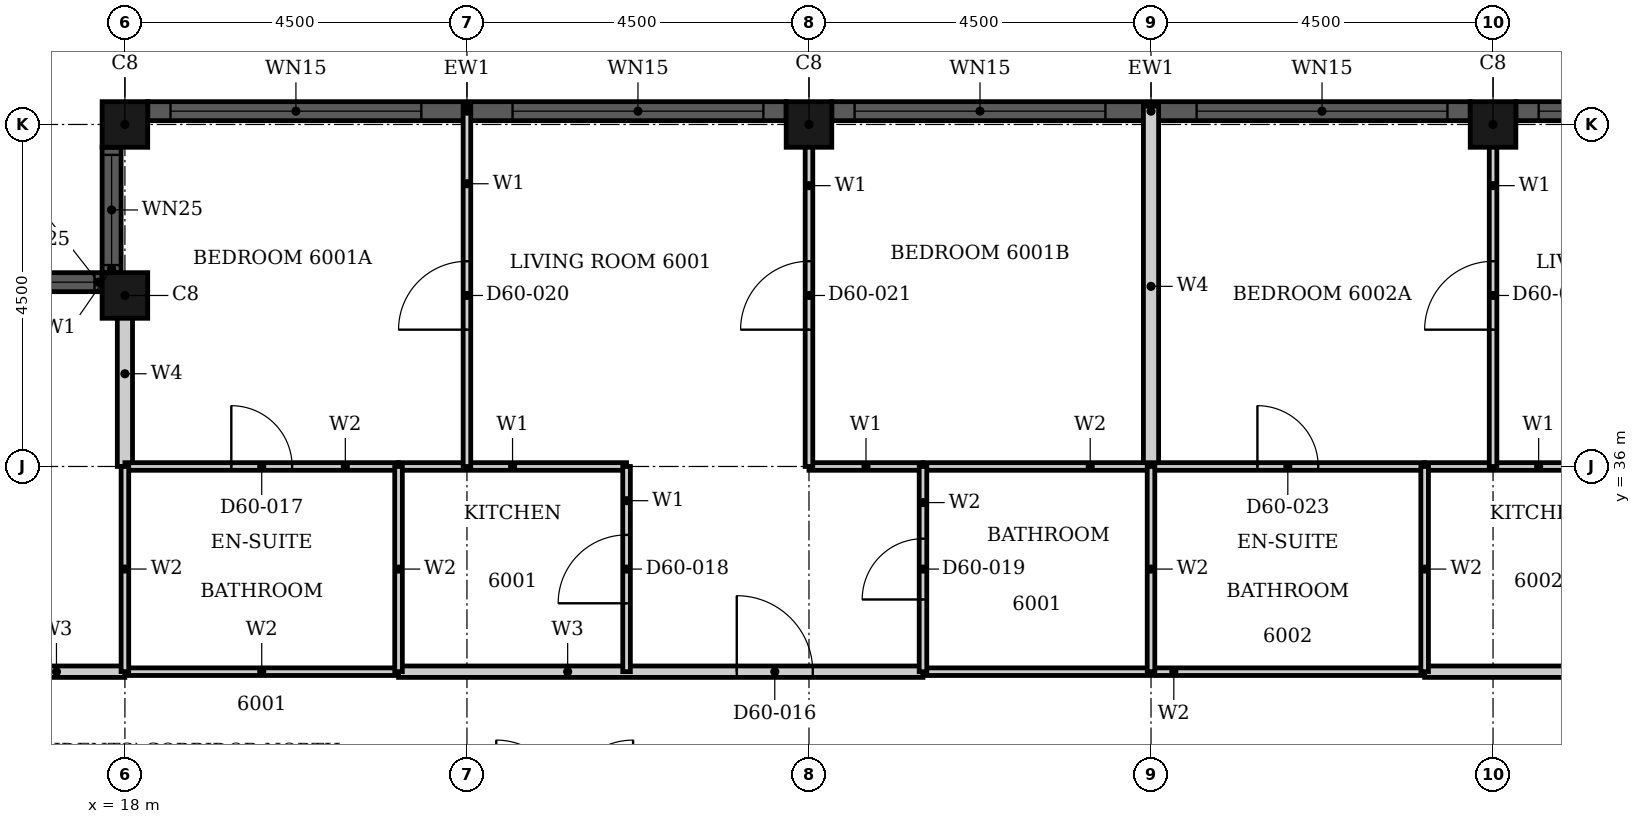
"""IFC4 building model, lengths in metres.
Left out: names, types, materials, properties, quantities, classifications, styles, units other than length and angle.
Written with IfcOpenShell. Run it as: python <this file> out.ifc"""

import sys

from ifc_helpers import new_model, si_unit, direction, frame, frame_2d, origin, origin_2d, place, context, subcontext, project, spatial, rectangle, hollow_rectangle, extrude, element, fill, save


model = new_model("IFC4")
c1 = context("Model", 3, precision=1e-05, world=origin(), true_north=direction((0.0, 1.0)))
c2 = subcontext(c1, "Body", "Model", "MODEL_VIEW")
j1 = project(units=[si_unit("LENGTHUNIT", "METRE"), si_unit("PLANEANGLEUNIT", "RADIAN")], contexts=[c1])
p1 = place(None, origin())
s1 = spatial("IfcSite", under=j1, at=p1, CompositionType="ELEMENT")
p2 = place(p1, origin())
s2 = spatial("IfcBuilding", under=s1, at=p2, CompositionType="ELEMENT")
p3 = place(p2, frame((0.0, 0.0, 237.9)))
s3 = spatial("IfcBuildingStorey", under=s2, at=p3, CompositionType="ELEMENT", Elevation=237.9)
for number, where, z_axis, x_axis in (
    (1, (36.0, 40.5, 0.0), (0.0, 0.0, 1.0), (1.0, 0.0, 0.0)),
    (2, (27.0, 40.5, 0.0), (0.0, 0.0, 1.0), (1.0, 0.0, 0.0)),
    (3, (18.0, 40.5, 0.0), (0.0, 0.0, 1.0), (1.0, 0.0, 0.0)),
    (4, (18.0, 38.25, 0.0), (0.0, 0.0, 1.0), (1.0, 0.0, 0.0)),
):
    element("IfcColumn", number, at=place(p3, frame(where, z_axis=z_axis, x_axis=x_axis)), inside=s3, PredefinedType="COLUMN", context=c2, shape_type="SweptSolid", body=[
        extrude(hollow_rectangle(XDim=0.6, YDim=0.6, WallThickness=0.02, at=origin_2d()), origin(), (0.0, 0.0, 1.0), 3.7),
    ])
p4 = place(p3, frame((44.7, 40.675, 0.0), z_axis=(0.0, 0.0, 1.0), x_axis=(-1.0, 0.0, 0.0)))
e5 = element("IfcWall", 5, at=p4, inside=s3, PredefinedType="SOLIDWALL", context=c2, shape_type="SweptSolid", body=[
    extrude(rectangle(XDim=8.4, YDim=0.25, at=frame_2d((4.2, 0.0))), origin(), (0.0, 0.0, 1.0), 3.7),
])
p5 = place(p4, frame((0.3, 0.0, 0.45)))
e6 = element("IfcOpeningElement", 6, at=p5, cuts=e5, PredefinedType="OPENING", context=c2, shape_type="SweptSolid", body=[
    extrude(rectangle(XDim=3.3, YDim=2.3, at=frame_2d((1.65, 1.15))), frame((0.0, 0.135, 0.0), z_axis=(0.0, -1.0, 0.0), x_axis=(1.0, 0.0, 0.0)), (0.0, 0.0, 1.0), 0.27),
])
p6 = place(p4, frame((4.8, 0.0, 0.45)))
e7 = element("IfcOpeningElement", 7, at=p6, cuts=e5, PredefinedType="OPENING", context=c2, shape_type="SweptSolid", body=[
    extrude(rectangle(XDim=3.3, YDim=2.3, at=frame_2d((1.65, 1.15))), frame((0.0, 0.135, 0.0), z_axis=(0.0, -1.0, 0.0), x_axis=(1.0, 0.0, 0.0)), (0.0, 0.0, 1.0), 0.27),
])
p7 = place(p3, frame((35.7, 40.675, 0.0), z_axis=(0.0, 0.0, 1.0), x_axis=(-1.0, 0.0, 0.0)))
e8 = element("IfcWall", 8, at=p7, inside=s3, PredefinedType="SOLIDWALL", context=c2, shape_type="SweptSolid", body=[
    extrude(rectangle(XDim=8.4, YDim=0.25, at=frame_2d((4.2, 0.0))), origin(), (0.0, 0.0, 1.0), 3.7),
])
p8 = place(p7, frame((0.3, 0.0, 0.45)))
e9 = element("IfcOpeningElement", 9, at=p8, cuts=e8, PredefinedType="OPENING", context=c2, shape_type="SweptSolid", body=[
    extrude(rectangle(XDim=3.3, YDim=2.3, at=frame_2d((1.65, 1.15))), frame((0.0, 0.135, 0.0), z_axis=(0.0, -1.0, 0.0), x_axis=(1.0, 0.0, 0.0)), (0.0, 0.0, 1.0), 0.27),
])
p9 = place(p7, frame((4.8, 0.0, 0.45)))
e10 = element("IfcOpeningElement", 10, at=p9, cuts=e8, PredefinedType="OPENING", context=c2, shape_type="SweptSolid", body=[
    extrude(rectangle(XDim=3.3, YDim=2.3, at=frame_2d((1.65, 1.15))), frame((0.0, 0.135, 0.0), z_axis=(0.0, -1.0, 0.0), x_axis=(1.0, 0.0, 0.0)), (0.0, 0.0, 1.0), 0.27),
])
p10 = place(p3, frame((26.7, 40.675, 0.0), z_axis=(0.0, 0.0, 1.0), x_axis=(-1.0, 0.0, 0.0)))
e11 = element("IfcWall", 11, at=p10, inside=s3, PredefinedType="SOLIDWALL", context=c2, shape_type="SweptSolid", body=[
    extrude(rectangle(XDim=8.4, YDim=0.25, at=frame_2d((4.2, 0.0))), origin(), (0.0, 0.0, 1.0), 3.7),
])
p11 = place(p10, frame((0.3, 0.0, 0.45)))
e12 = element("IfcOpeningElement", 12, at=p11, cuts=e11, PredefinedType="OPENING", context=c2, shape_type="SweptSolid", body=[
    extrude(rectangle(XDim=3.3, YDim=2.3, at=frame_2d((1.65, 1.15))), frame((0.0, 0.135, 0.0), z_axis=(0.0, -1.0, 0.0), x_axis=(1.0, 0.0, 0.0)), (0.0, 0.0, 1.0), 0.27),
])
p12 = place(p10, frame((4.8, 0.0, 0.45)))
e13 = element("IfcOpeningElement", 13, at=p12, cuts=e11, PredefinedType="OPENING", context=c2, shape_type="SweptSolid", body=[
    extrude(rectangle(XDim=3.3, YDim=2.3, at=frame_2d((1.65, 1.15))), frame((0.0, 0.135, 0.0), z_axis=(0.0, -1.0, 0.0), x_axis=(1.0, 0.0, 0.0)), (0.0, 0.0, 1.0), 0.27),
])
p13 = place(p3, frame((17.825, 40.2, 0.0), z_axis=(0.0, 0.0, 1.0), x_axis=(0.0, -1.0, 0.0)))
e14 = element("IfcWall", 14, at=p13, inside=s3, PredefinedType="SOLIDWALL", context=c2, shape_type="SweptSolid", body=[
    extrude(rectangle(XDim=1.65, YDim=0.25, at=frame_2d((0.825, 0.0))), origin(), (0.0, 0.0, 1.0), 3.7),
])
p14 = place(p13, frame((0.1, 0.0, 0.9)))
e15 = element("IfcOpeningElement", 15, at=p14, cuts=e14, PredefinedType="OPENING", context=c2, shape_type="SweptSolid", body=[
    extrude(rectangle(XDim=1.45, YDim=1.85, at=frame_2d((0.725, 0.925))), frame((0.0, 0.135, 0.0), z_axis=(0.0, -1.0, 0.0), x_axis=(1.0, 0.0, 0.0)), (0.0, 0.0, 1.0), 0.27),
])
p15 = place(p3, frame((17.7, 38.425, 0.0), z_axis=(0.0, 0.0, 1.0), x_axis=(-1.0, 0.0, 0.0)))
e16 = element("IfcWall", 16, at=p15, inside=s3, PredefinedType="SOLIDWALL", context=c2, shape_type="SweptSolid", body=[
    extrude(rectangle(XDim=1.65, YDim=0.25, at=frame_2d((0.825, 0.0))), origin(), (0.0, 0.0, 1.0), 3.7),
])
p16 = place(p15, frame((0.1, 0.0, 0.9)))
e17 = element("IfcOpeningElement", 17, at=p16, cuts=e16, PredefinedType="OPENING", context=c2, shape_type="SweptSolid", body=[
    extrude(rectangle(XDim=1.45, YDim=1.85, at=frame_2d((0.725, 0.925))), frame((0.0, 0.135, 0.0), z_axis=(0.0, -1.0, 0.0), x_axis=(1.0, 0.0, 0.0)), (0.0, 0.0, 1.0), 0.27),
])
p17 = place(p3, frame((21.6, 33.3, 0.0), z_axis=(0.0, 0.0, 1.0), x_axis=(1.0, 0.0, 0.0)))
e18 = element("IfcWall", 18, at=p17, inside=s3, PredefinedType="PARTITIONING", context=c2, shape_type="SweptSolid", body=[
    extrude(rectangle(XDim=6.9, YDim=0.15, at=frame_2d((3.45, 0.0))), origin(), (0.0, 0.0, 1.0), 3.4),
])
p18 = place(p17, frame((4.45, 0.0, 0.0)))
e19 = element("IfcOpeningElement", 19, at=p18, cuts=e18, PredefinedType="OPENING", context=c2, shape_type="SweptSolid", body=[
    extrude(rectangle(XDim=1.0, YDim=2.2, at=frame_2d((0.5, 1.1))), frame((0.0, 0.085, 0.0), z_axis=(0.0, -1.0, 0.0), x_axis=(1.0, 0.0, 0.0)), (0.0, 0.0, 1.0), 0.17),
])
p19 = place(p3, frame((35.1, 33.3, 0.0), z_axis=(0.0, 0.0, 1.0), x_axis=(1.0, 0.0, 0.0)))
e20 = element("IfcWall", 20, at=p19, inside=s3, PredefinedType="PARTITIONING", context=c2, shape_type="SweptSolid", body=[
    extrude(rectangle(XDim=6.9, YDim=0.15, at=frame_2d((3.45, 0.0))), origin(), (0.0, 0.0, 1.0), 3.4),
])
p20 = place(p19, frame((4.45, 0.0, 0.0)))
e21 = element("IfcOpeningElement", 21, at=p20, cuts=e20, PredefinedType="OPENING", context=c2, shape_type="SweptSolid", body=[
    extrude(rectangle(XDim=1.0, YDim=2.2, at=frame_2d((0.5, 1.1))), frame((0.0, 0.085, 0.0), z_axis=(0.0, -1.0, 0.0), x_axis=(1.0, 0.0, 0.0)), (0.0, 0.0, 1.0), 0.17),
])
p21 = place(p3, frame((16.2, 33.3, 0.0), z_axis=(0.0, 0.0, 1.0), x_axis=(1.0, 0.0, 0.0)))
e22 = element("IfcWall", 22, at=p21, inside=s3, PredefinedType="PARTITIONING", context=c2, shape_type="SweptSolid", body=[
    extrude(rectangle(XDim=1.799, YDim=0.15, at=frame_2d((0.899, 0.0))), origin(), (0.0, 0.0, 1.0), 3.4),
])
p22 = place(p3, frame((27.0, 36.0, 0.0), z_axis=(0.0, 0.0, 1.0), x_axis=(1.0, 0.0, 0.0)))
e23 = element("IfcWall", 23, at=p22, inside=s3, PredefinedType="PARTITIONING", context=c2, shape_type="SweptSolid", body=[
    extrude(rectangle(XDim=1.5, YDim=0.1, at=frame_2d((0.75, 0.0))), origin(), (0.0, 0.0, 1.0), 3.4),
])
for number, where, z_axis, x_axis in (
    (24, (21.6, 36.0, 0.0), (0.0, 0.0, 1.0), (1.0, 0.0, 0.0)),
    (25, (35.1, 36.0, 0.0), (0.0, 0.0, 1.0), (1.0, 0.0, 0.0)),
):
    element("IfcWall", number, at=place(p3, frame(where, z_axis=z_axis, x_axis=x_axis)), inside=s3, PredefinedType="PARTITIONING", context=c2, shape_type="SweptSolid", body=[
        extrude(rectangle(XDim=3.0, YDim=0.1, at=frame_2d((1.5, 0.0))), origin(), (0.0, 0.0, 1.0), 3.4),
    ])
p23 = place(p3, frame((22.5, 36.0, 0.0), z_axis=(0.0, 0.0, 1.0), x_axis=(0.0, 1.0, 0.0)))
e26 = element("IfcWall", 26, at=p23, inside=s3, PredefinedType="PARTITIONING", context=c2, shape_type="SweptSolid", body=[
    extrude(rectangle(XDim=4.74, YDim=0.1, at=frame_2d((2.37, 0.0))), origin(), (0.0, 0.0, 1.0), 3.4),
])
p24 = place(p23, frame((1.8, 0.0, 0.0)))
e27 = element("IfcOpeningElement", 27, at=p24, cuts=e26, PredefinedType="OPENING", context=c2, shape_type="SweptSolid", body=[
    extrude(rectangle(XDim=0.9, YDim=2.1, at=frame_2d((0.45, 1.05))), frame((0.0, 0.06, 0.0), z_axis=(0.0, -1.0, 0.0), x_axis=(1.0, 0.0, 0.0)), (0.0, 0.0, 1.0), 0.12),
])
p25 = place(p3, frame((24.6, 33.3, 0.0), z_axis=(0.0, 0.0, 1.0), x_axis=(0.0, 1.0, 0.0)))
e28 = element("IfcWall", 28, at=p25, inside=s3, PredefinedType="PARTITIONING", context=c2, shape_type="SweptSolid", body=[
    extrude(rectangle(XDim=2.7, YDim=0.1, at=frame_2d((1.35, 0.0))), origin(), (0.0, 0.0, 1.0), 3.4),
])
p26 = place(p25, frame((0.9, 0.0, 0.0)))
e29 = element("IfcOpeningElement", 29, at=p26, cuts=e28, PredefinedType="OPENING", context=c2, shape_type="SweptSolid", body=[
    extrude(rectangle(XDim=0.9, YDim=2.1, at=frame_2d((0.45, 1.05))), frame((0.0, 0.06, 0.0), z_axis=(0.0, -1.0, 0.0), x_axis=(1.0, 0.0, 0.0)), (0.0, 0.0, 1.0), 0.12),
])
p27 = place(p3, frame((27.0, 36.0, 0.0), z_axis=(0.0, 0.0, 1.0), x_axis=(0.0, 1.0, 0.0)))
e30 = element("IfcWall", 30, at=p27, inside=s3, PredefinedType="PARTITIONING", context=c2, shape_type="SweptSolid", body=[
    extrude(rectangle(XDim=4.69, YDim=0.1, at=frame_2d((2.345, 0.0))), origin(), (0.0, 0.0, 1.0), 3.4),
])
p28 = place(p27, frame((1.8, 0.0, 0.0)))
e31 = element("IfcOpeningElement", 31, at=p28, cuts=e30, PredefinedType="OPENING", context=c2, shape_type="SweptSolid", body=[
    extrude(rectangle(XDim=0.9, YDim=2.1, at=frame_2d((0.45, 1.05))), frame((0.0, 0.06, 0.0), z_axis=(0.0, -1.0, 0.0), x_axis=(1.0, 0.0, 0.0)), (0.0, 0.0, 1.0), 0.12),
])
p29 = place(p3, frame((36.0, 36.0, 0.0), z_axis=(0.0, 0.0, 1.0), x_axis=(0.0, 1.0, 0.0)))
e32 = element("IfcWall", 32, at=p29, inside=s3, PredefinedType="PARTITIONING", context=c2, shape_type="SweptSolid", body=[
    extrude(rectangle(XDim=4.69, YDim=0.1, at=frame_2d((2.345, 0.0))), origin(), (0.0, 0.0, 1.0), 3.4),
])
p30 = place(p29, frame((1.8, 0.0, 0.0)))
e33 = element("IfcOpeningElement", 33, at=p30, cuts=e32, PredefinedType="OPENING", context=c2, shape_type="SweptSolid", body=[
    extrude(rectangle(XDim=0.9, YDim=2.1, at=frame_2d((0.45, 1.05))), frame((0.0, 0.06, 0.0), z_axis=(0.0, -1.0, 0.0), x_axis=(1.0, 0.0, 0.0)), (0.0, 0.0, 1.0), 0.12),
])
p31 = place(p3, frame((18.0, 36.0, 0.0), z_axis=(0.0, 0.0, 1.0), x_axis=(0.0, 1.0, 0.0)))
e34 = element("IfcWall", 34, at=p31, inside=s3, PredefinedType="PARTITIONING", context=c2, shape_type="SweptSolid", body=[
    extrude(rectangle(XDim=2.44, YDim=0.2, at=frame_2d((1.22, 0.0))), origin(), (0.0, 0.0, 1.0), 3.4),
])
p32 = place(p3, frame((31.5, 36.0, 0.0), z_axis=(0.0, 0.0, 1.0), x_axis=(0.0, 1.0, 0.0)))
e35 = element("IfcWall", 35, at=p32, inside=s3, PredefinedType="PARTITIONING", context=c2, shape_type="SweptSolid", body=[
    extrude(rectangle(XDim=4.74, YDim=0.2, at=frame_2d((2.37, 0.0))), origin(), (0.0, 0.0, 1.0), 3.4),
])
p33 = place(p3, frame((28.5, 33.3, 0.0), z_axis=(0.0, 0.0, 1.0), x_axis=(1.0, 0.0, 0.0)))
e36 = element("IfcWall", 36, at=p33, inside=s3, PredefinedType="PARTITIONING", context=c2, shape_type="SweptSolid", body=[
    extrude(rectangle(XDim=6.6, YDim=0.1, at=frame_2d((3.3, 0.0))), origin(), (0.0, 0.0, 1.0), 3.4),
])
p34 = place(p3, frame((18.0, 33.3, 0.0), z_axis=(0.0, 0.0, 1.0), x_axis=(1.0, 0.0, 0.0)))
e37 = element("IfcWall", 37, at=p34, inside=s3, PredefinedType="PARTITIONING", context=c2, shape_type="SweptSolid", body=[
    extrude(rectangle(XDim=3.6, YDim=0.1, at=frame_2d((1.8, 0.0))), origin(), (0.0, 0.0, 1.0), 3.4),
])
p35 = place(p3, frame((28.5, 36.0, 0.0), z_axis=(0.0, 0.0, 1.0), x_axis=(1.0, 0.0, 0.0)))
e38 = element("IfcWall", 38, at=p35, inside=s3, PredefinedType="PARTITIONING", context=c2, shape_type="SweptSolid", body=[
    extrude(rectangle(XDim=6.6, YDim=0.1, at=frame_2d((3.3, 0.0))), origin(), (0.0, 0.0, 1.0), 3.4),
])
p36 = place(p35, frame((4.4, 0.0, 0.0)))
e39 = element("IfcOpeningElement", 39, at=p36, cuts=e38, PredefinedType="OPENING", context=c2, shape_type="SweptSolid", body=[
    extrude(rectangle(XDim=0.8, YDim=2.1, at=frame_2d((0.4, 1.05))), frame((0.0, 0.06, 0.0), z_axis=(0.0, -1.0, 0.0), x_axis=(1.0, 0.0, 0.0)), (0.0, 0.0, 1.0), 0.12),
])
p37 = place(p3, frame((18.0, 36.0, 0.0), z_axis=(0.0, 0.0, 1.0), x_axis=(1.0, 0.0, 0.0)))
e40 = element("IfcWall", 40, at=p37, inside=s3, PredefinedType="PARTITIONING", context=c2, shape_type="SweptSolid", body=[
    extrude(rectangle(XDim=3.6, YDim=0.1, at=frame_2d((1.8, 0.0))), origin(), (0.0, 0.0, 1.0), 3.4),
])
p38 = place(p37, frame((1.4, 0.0, 0.0)))
e41 = element("IfcOpeningElement", 41, at=p38, cuts=e40, PredefinedType="OPENING", context=c2, shape_type="SweptSolid", body=[
    extrude(rectangle(XDim=0.8, YDim=2.1, at=frame_2d((0.4, 1.05))), frame((0.0, 0.06, 0.0), z_axis=(0.0, -1.0, 0.0), x_axis=(1.0, 0.0, 0.0)), (0.0, 0.0, 1.0), 0.12),
])
p39 = place(p3, frame((18.0, 33.301, 0.0), z_axis=(0.0, 0.0, 1.0), x_axis=(0.0, 1.0, 0.0)))
e42 = element("IfcWall", 42, at=p39, inside=s3, PredefinedType="PARTITIONING", context=c2, shape_type="SweptSolid", body=[
    extrude(rectangle(XDim=2.699, YDim=0.1, at=frame_2d((1.35, 0.0))), origin(), (0.0, 0.0, 1.0), 3.4),
])
p40 = place(p3, frame((21.6, 33.3, 0.0), z_axis=(0.0, 0.0, 1.0), x_axis=(0.0, 1.0, 0.0)))
e43 = element("IfcWall", 43, at=p40, inside=s3, PredefinedType="PARTITIONING", context=c2, shape_type="SweptSolid", body=[
    extrude(rectangle(XDim=2.7, YDim=0.1, at=frame_2d((1.35, 0.0))), origin(), (0.0, 0.0, 1.0), 3.4),
])
p41 = place(p3, frame((28.5, 33.3, 0.0), z_axis=(0.0, 0.0, 1.0), x_axis=(0.0, 1.0, 0.0)))
e44 = element("IfcWall", 44, at=p41, inside=s3, PredefinedType="PARTITIONING", context=c2, shape_type="SweptSolid", body=[
    extrude(rectangle(XDim=2.7, YDim=0.1, at=frame_2d((1.35, 0.0))), origin(), (0.0, 0.0, 1.0), 3.4),
])
p42 = place(p41, frame((0.95, 0.0, 0.0)))
e45 = element("IfcOpeningElement", 45, at=p42, cuts=e44, PredefinedType="OPENING", context=c2, shape_type="SweptSolid", body=[
    extrude(rectangle(XDim=0.8, YDim=2.1, at=frame_2d((0.4, 1.05))), frame((0.0, 0.06, 0.0), z_axis=(0.0, -1.0, 0.0), x_axis=(1.0, 0.0, 0.0)), (0.0, 0.0, 1.0), 0.12),
])
for number, where, z_axis, x_axis in (
    (46, (31.5, 33.3, 0.0), (0.0, 0.0, 1.0), (0.0, 1.0, 0.0)),
    (47, (35.1, 33.3, 0.0), (0.0, 0.0, 1.0), (0.0, 1.0, 0.0)),
):
    element("IfcWall", number, at=place(p3, frame(where, z_axis=z_axis, x_axis=x_axis)), inside=s3, PredefinedType="PARTITIONING", context=c2, shape_type="SweptSolid", body=[
        extrude(rectangle(XDim=2.7, YDim=0.1, at=frame_2d((1.35, 0.0))), origin(), (0.0, 0.0, 1.0), 3.4),
    ])
p43 = place(p6, origin())
e48 = element("IfcWindow", 48, at=p43, inside=s3, PartitioningType="SINGLE_PANEL", PredefinedType="WINDOW", context=c2, shape_type="SweptSolid", body=[
    extrude(rectangle(XDim=3.3, YDim=2.3, at=frame_2d((1.65, 1.15))), frame((0.0, 0.03, 0.0), z_axis=(0.0, -1.0, 0.0), x_axis=(1.0, 0.0, 0.0)), (0.0, 0.0, 1.0), 0.06),
])
fill(e7, e48)
p44 = place(p8, origin())
e49 = element("IfcWindow", 49, at=p44, inside=s3, PartitioningType="SINGLE_PANEL", PredefinedType="WINDOW", context=c2, shape_type="SweptSolid", body=[
    extrude(rectangle(XDim=3.3, YDim=2.3, at=frame_2d((1.65, 1.15))), frame((0.0, 0.03, 0.0), z_axis=(0.0, -1.0, 0.0), x_axis=(1.0, 0.0, 0.0)), (0.0, 0.0, 1.0), 0.06),
])
fill(e9, e49)
p45 = place(p9, origin())
e50 = element("IfcWindow", 50, at=p45, inside=s3, PartitioningType="SINGLE_PANEL", PredefinedType="WINDOW", context=c2, shape_type="SweptSolid", body=[
    extrude(rectangle(XDim=3.3, YDim=2.3, at=frame_2d((1.65, 1.15))), frame((0.0, 0.03, 0.0), z_axis=(0.0, -1.0, 0.0), x_axis=(1.0, 0.0, 0.0)), (0.0, 0.0, 1.0), 0.06),
])
fill(e10, e50)
p46 = place(p11, origin())
e51 = element("IfcWindow", 51, at=p46, inside=s3, PartitioningType="SINGLE_PANEL", PredefinedType="WINDOW", context=c2, shape_type="SweptSolid", body=[
    extrude(rectangle(XDim=3.3, YDim=2.3, at=frame_2d((1.65, 1.15))), frame((0.0, 0.03, 0.0), z_axis=(0.0, -1.0, 0.0), x_axis=(1.0, 0.0, 0.0)), (0.0, 0.0, 1.0), 0.06),
])
fill(e12, e51)
p47 = place(p12, origin())
e52 = element("IfcWindow", 52, at=p47, inside=s3, PartitioningType="SINGLE_PANEL", PredefinedType="WINDOW", context=c2, shape_type="SweptSolid", body=[
    extrude(rectangle(XDim=3.3, YDim=2.3, at=frame_2d((1.65, 1.15))), frame((0.0, 0.03, 0.0), z_axis=(0.0, -1.0, 0.0), x_axis=(1.0, 0.0, 0.0)), (0.0, 0.0, 1.0), 0.06),
])
fill(e13, e52)
p48 = place(p14, origin())
e53 = element("IfcWindow", 53, at=p48, inside=s3, PartitioningType="SINGLE_PANEL", PredefinedType="WINDOW", context=c2, shape_type="SweptSolid", body=[
    extrude(rectangle(XDim=1.45, YDim=1.85, at=frame_2d((0.725, 0.925))), frame((0.0, 0.03, 0.0), z_axis=(0.0, -1.0, 0.0), x_axis=(1.0, 0.0, 0.0)), (0.0, 0.0, 1.0), 0.06),
])
fill(e15, e53)
p49 = place(p16, origin())
e54 = element("IfcWindow", 54, at=p49, inside=s3, PartitioningType="SINGLE_PANEL", PredefinedType="WINDOW", context=c2, shape_type="SweptSolid", body=[
    extrude(rectangle(XDim=1.45, YDim=1.85, at=frame_2d((0.725, 0.925))), frame((0.0, 0.03, 0.0), z_axis=(0.0, -1.0, 0.0), x_axis=(1.0, 0.0, 0.0)), (0.0, 0.0, 1.0), 0.06),
])
fill(e17, e54)
p50 = place(p18, origin())
e55 = element("IfcDoor", 55, at=p50, inside=s3, OperationType="SINGLE_SWING_RIGHT", PredefinedType="DOOR", context=c2, shape_type="SweptSolid", body=[
    extrude(rectangle(XDim=1.0, YDim=2.2, at=frame_2d((0.5, 1.1))), frame((0.0, 0.025, 0.0), z_axis=(0.0, -1.0, 0.0), x_axis=(1.0, 0.0, 0.0)), (0.0, 0.0, 1.0), 0.05),
])
fill(e19, e55)
p51 = place(p38, origin())
e56 = element("IfcDoor", 56, at=p51, inside=s3, OperationType="SINGLE_SWING_RIGHT", PredefinedType="DOOR", context=c2, shape_type="SweptSolid", body=[
    extrude(rectangle(XDim=0.8, YDim=2.1, at=frame_2d((0.4, 1.05))), frame((0.0, 0.025, 0.0), z_axis=(0.0, -1.0, 0.0), x_axis=(1.0, 0.0, 0.0)), (0.0, 0.0, 1.0), 0.05),
])
fill(e41, e56)
p52 = place(p26, origin())
e57 = element("IfcDoor", 57, at=p52, inside=s3, OperationType="SINGLE_SWING_RIGHT", PredefinedType="DOOR", context=c2, shape_type="SweptSolid", body=[
    extrude(rectangle(XDim=0.9, YDim=2.1, at=frame_2d((0.45, 1.05))), frame((0.0, 0.025, 0.0), z_axis=(0.0, -1.0, 0.0), x_axis=(1.0, 0.0, 0.0)), (0.0, 0.0, 1.0), 0.05),
])
fill(e29, e57)
p53 = place(p42, origin())
e58 = element("IfcDoor", 58, at=p53, inside=s3, OperationType="SINGLE_SWING_RIGHT", PredefinedType="DOOR", context=c2, shape_type="SweptSolid", body=[
    extrude(rectangle(XDim=0.8, YDim=2.1, at=frame_2d((0.4, 1.05))), frame((0.0, 0.025, 0.0), z_axis=(0.0, -1.0, 0.0), x_axis=(1.0, 0.0, 0.0)), (0.0, 0.0, 1.0), 0.05),
])
fill(e45, e58)
p54 = place(p24, origin())
e59 = element("IfcDoor", 59, at=p54, inside=s3, OperationType="SINGLE_SWING_LEFT", PredefinedType="DOOR", context=c2, shape_type="SweptSolid", body=[
    extrude(rectangle(XDim=0.9, YDim=2.1, at=frame_2d((0.45, 1.05))), frame((0.0, 0.025, 0.0), z_axis=(0.0, -1.0, 0.0), x_axis=(1.0, 0.0, 0.0)), (0.0, 0.0, 1.0), 0.05),
])
fill(e27, e59)
p55 = place(p28, origin())
e60 = element("IfcDoor", 60, at=p55, inside=s3, OperationType="SINGLE_SWING_LEFT", PredefinedType="DOOR", context=c2, shape_type="SweptSolid", body=[
    extrude(rectangle(XDim=0.9, YDim=2.1, at=frame_2d((0.45, 1.05))), frame((0.0, 0.025, 0.0), z_axis=(0.0, -1.0, 0.0), x_axis=(1.0, 0.0, 0.0)), (0.0, 0.0, 1.0), 0.05),
])
fill(e31, e60)
p56 = place(p36, origin())
e61 = element("IfcDoor", 61, at=p56, inside=s3, OperationType="SINGLE_SWING_RIGHT", PredefinedType="DOOR", context=c2, shape_type="SweptSolid", body=[
    extrude(rectangle(XDim=0.8, YDim=2.1, at=frame_2d((0.4, 1.05))), frame((0.0, 0.025, 0.0), z_axis=(0.0, -1.0, 0.0), x_axis=(1.0, 0.0, 0.0)), (0.0, 0.0, 1.0), 0.05),
])
fill(e39, e61)
p57 = place(p30, origin())
e62 = element("IfcDoor", 62, at=p57, inside=s3, OperationType="SINGLE_SWING_LEFT", PredefinedType="DOOR", context=c2, shape_type="SweptSolid", body=[
    extrude(rectangle(XDim=0.9, YDim=2.1, at=frame_2d((0.45, 1.05))), frame((0.0, 0.025, 0.0), z_axis=(0.0, -1.0, 0.0), x_axis=(1.0, 0.0, 0.0)), (0.0, 0.0, 1.0), 0.05),
])
fill(e33, e62)
save(model, sys.argv[1])
